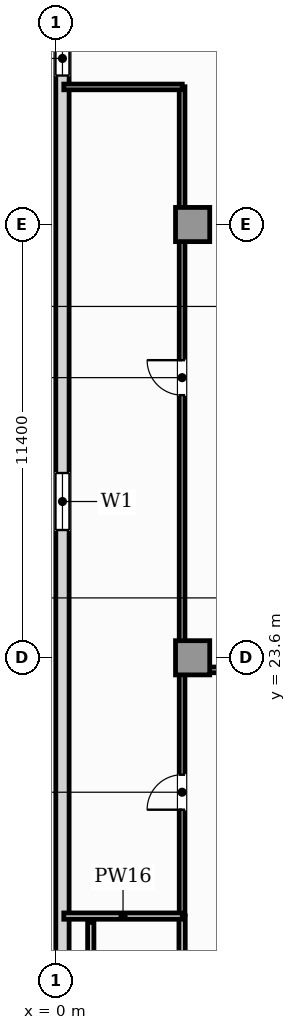
"""IFC4 building model, lengths in metres.
Left out: names, types, materials, properties, quantities, classifications, styles, units other than length and angle.
Written with IfcOpenShell. Run it as: python <this file> out.ifc"""

import sys

from ifc_helpers import new_model, si_unit, direction, frame, frame_2d, origin, origin_2d, place, context, subcontext, project, spatial, rectangle, extrude, element, fill, save


model = new_model("IFC4")
c1 = context("Model", 3, precision=1e-05, world=origin(), true_north=direction((0.0, 1.0)))
c2 = subcontext(c1, "Body", "Model", "MODEL_VIEW")
j1 = project(units=[si_unit("LENGTHUNIT", "METRE"), si_unit("PLANEANGLEUNIT", "RADIAN")], contexts=[c1])
p1 = place(None, origin())
s1 = spatial("IfcSite", under=j1, at=p1, CompositionType="ELEMENT")
p2 = place(p1, origin())
s2 = spatial("IfcBuilding", under=s1, at=p2, CompositionType="ELEMENT")
p3 = place(p2, frame((0.0, 0.0, 72.15)))
s3 = spatial("IfcBuildingStorey", under=s2, at=p3, CompositionType="ELEMENT", Elevation=72.15)
for number, where, z_axis, x_axis in (
    (1, (3.6, 23.6, 0.0), (0.0, 0.0, 1.0), (1.0, 0.0, 0.0)),
    (2, (3.6, 35.0, 0.0), (0.0, 0.0, 1.0), (1.0, 0.0, 0.0)),
):
    element("IfcColumn", number, at=place(p3, frame(where, z_axis=z_axis, x_axis=x_axis)), inside=s3, PredefinedType="COLUMN", context=c2, shape_type="SweptSolid", body=[
        extrude(rectangle(XDim=0.9, YDim=0.9, at=origin_2d()), origin(), (0.0, 0.0, 1.0), 3.85),
    ])
p4 = place(p3, frame((0.175, 43.16, 0.0), z_axis=(0.0, 0.0, 1.0), x_axis=(0.0, -1.0, 0.0)))
e3 = element("IfcWall", 3, at=p4, inside=s3, PredefinedType="SOLIDWALL", context=c2, shape_type="SweptSolid", body=[
    extrude(rectangle(XDim=39.92, YDim=0.35, at=frame_2d((19.96, 0.0))), origin(), (0.0, 0.0, 1.0), 3.57),
])
p5 = place(p4, frame((3.34, 0.0, 0.95)))
e4 = element("IfcOpeningElement", 4, at=p5, cuts=e3, PredefinedType="OPENING", context=c2, shape_type="SweptSolid", body=[
    extrude(rectangle(XDim=0.9, YDim=1.5, at=frame_2d((0.45, 0.75))), frame((0.0, 0.185, 0.0), z_axis=(0.0, -1.0, 0.0), x_axis=(1.0, 0.0, 0.0)), (0.0, 0.0, 1.0), 0.37),
])
p6 = place(p4, frame((14.698, 0.0, 0.9)))
e5 = element("IfcOpeningElement", 5, at=p6, cuts=e3, PredefinedType="OPENING", context=c2, shape_type="SweptSolid", body=[
    extrude(rectangle(XDim=1.5, YDim=1.95, at=frame_2d((0.75, 0.975))), frame((0.0, 0.185, 0.0), z_axis=(0.0, -1.0, 0.0), x_axis=(1.0, 0.0, 0.0)), (0.0, 0.0, 1.0), 0.37),
])
p7 = place(p3, frame((3.318, 23.282, 0.0), z_axis=(0.0, 0.0, 1.0), x_axis=(1.0, 0.0, 0.0)))
e6 = element("IfcWall", 6, at=p7, inside=s3, PredefinedType="PARTITIONING", context=c2, shape_type="SweptSolid", body=[
    extrude(rectangle(XDim=3.832, YDim=0.15, at=frame_2d((1.916, 0.0))), origin(), (0.0, 0.0, 1.0), 3.57),
])
p8 = place(p7, frame((1.456, 0.0, 0.0)))
e7 = element("IfcOpeningElement", 7, at=p8, cuts=e6, PredefinedType="OPENING", context=c2, shape_type="SweptSolid", body=[
    extrude(rectangle(XDim=0.92, YDim=2.1, at=frame_2d((0.46, 1.05))), frame((0.0, 0.085, 0.0), z_axis=(0.0, -1.0, 0.0), x_axis=(1.0, 0.0, 0.0)), (0.0, 0.0, 1.0), 0.17),
])
p9 = place(p3, frame((3.323, 13.765, 0.0), z_axis=(0.0, 0.0, 1.0), x_axis=(0.0, 1.0, 0.0)))
e8 = element("IfcWall", 8, at=p9, inside=s3, PredefinedType="PLUMBINGWALL", context=c2, shape_type="SweptSolid", body=[
    extrude(rectangle(XDim=3.044, YDim=0.165, at=frame_2d((1.522, 0.0))), origin(), (0.0, 0.0, 1.0), 3.57),
])
p10 = place(p9, frame((1.097, 0.0, 0.0)))
e9 = element("IfcOpeningElement", 9, at=p10, cuts=e8, PredefinedType="OPENING", context=c2, shape_type="SweptSolid", body=[
    extrude(rectangle(XDim=0.85, YDim=2.1, at=frame_2d((0.425, 1.05))), frame((0.0, 0.093, 0.0), z_axis=(0.0, -1.0, 0.0), x_axis=(1.0, 0.0, 0.0)), (0.0, 0.0, 1.0), 0.185),
])
p11 = place(p3, frame((3.323, 16.839, 0.0), z_axis=(0.0, 0.0, 1.0), x_axis=(0.0, 1.0, 0.0)))
e10 = element("IfcWall", 10, at=p11, inside=s3, PredefinedType="PARTITIONING", context=c2, shape_type="SweptSolid", body=[
    extrude(rectangle(XDim=6.448, YDim=0.15, at=frame_2d((3.224, 0.0))), origin(), (0.0, 0.0, 1.0), 3.57),
])
p12 = place(p11, frame((2.764, 0.0, 0.0)))
e11 = element("IfcOpeningElement", 11, at=p12, cuts=e10, PredefinedType="OPENING", context=c2, shape_type="SweptSolid", body=[
    extrude(rectangle(XDim=0.92, YDim=2.1, at=frame_2d((0.46, 1.05))), frame((0.0, 0.085, 0.0), z_axis=(0.0, -1.0, 0.0), x_axis=(1.0, 0.0, 0.0)), (0.0, 0.0, 1.0), 0.17),
])
p13 = place(p3, frame((3.323, 23.317, 0.0), z_axis=(0.0, 0.0, 1.0), x_axis=(0.0, 1.0, 0.0)))
e12 = element("IfcWall", 12, at=p13, inside=s3, PredefinedType="PARTITIONING", context=c2, shape_type="SweptSolid", body=[
    extrude(rectangle(XDim=15.308, YDim=0.15, at=frame_2d((7.654, 0.0))), origin(), (0.0, 0.0, 1.0), 3.57),
])
p14 = place(p13, frame((7.194, 0.0, 0.0)))
e13 = element("IfcOpeningElement", 13, at=p14, cuts=e12, PredefinedType="OPENING", context=c2, shape_type="SweptSolid", body=[
    extrude(rectangle(XDim=0.92, YDim=2.1, at=frame_2d((0.46, 1.05))), frame((0.0, 0.085, 0.0), z_axis=(0.0, -1.0, 0.0), x_axis=(1.0, 0.0, 0.0)), (0.0, 0.0, 1.0), 0.17),
])
p15 = place(p3, frame((0.21, 38.62, 0.0), z_axis=(0.0, 0.0, 1.0), x_axis=(1.0, 0.0, 0.0)))
e14 = element("IfcWall", 14, at=p15, inside=s3, PredefinedType="PARTITIONING", context=c2, shape_type="SweptSolid", body=[
    extrude(rectangle(XDim=3.118, YDim=0.15, at=frame_2d((1.559, 0.0))), origin(), (0.0, 0.0, 1.0), 3.57),
])
p16 = place(p3, frame((0.21, 16.804, 0.0), z_axis=(0.0, 0.0, 1.0), x_axis=(1.0, 0.0, 0.0)))
e15 = element("IfcWall", 15, at=p16, inside=s3, PredefinedType="PLUMBINGWALL", context=c2, shape_type="SweptSolid", body=[
    extrude(rectangle(XDim=3.118, YDim=0.165, at=frame_2d((1.559, 0.0))), origin(), (0.0, 0.0, 1.0), 3.57),
])
p17 = place(p3, frame((0.92, 13.765, 0.0), z_axis=(0.0, 0.0, 1.0), x_axis=(0.0, 1.0, 0.0)))
e16 = element("IfcWall", 16, at=p17, inside=s3, PredefinedType="PLUMBINGWALL", context=c2, shape_type="SweptSolid", body=[
    extrude(rectangle(XDim=2.874, YDim=0.165, at=frame_2d((1.437, 0.0))), origin(), (0.0, 0.0, 1.0), 3.57),
])
p18 = place(p5, origin())
e17 = element("IfcWindow", 17, at=p18, inside=s3, PartitioningType="SINGLE_PANEL", PredefinedType="WINDOW", context=c2, shape_type="SweptSolid", body=[
    extrude(rectangle(XDim=0.9, YDim=1.5, at=frame_2d((0.45, 0.75))), frame((0.0, 0.03, 0.0), z_axis=(0.0, -1.0, 0.0), x_axis=(1.0, 0.0, 0.0)), (0.0, 0.0, 1.0), 0.06),
])
fill(e4, e17)
p19 = place(p6, origin())
e18 = element("IfcWindow", 18, at=p19, inside=s3, PartitioningType="SINGLE_PANEL", PredefinedType="WINDOW", context=c2, shape_type="SweptSolid", body=[
    extrude(rectangle(XDim=1.5, YDim=1.95, at=frame_2d((0.75, 0.975))), frame((0.0, 0.03, 0.0), z_axis=(0.0, -1.0, 0.0), x_axis=(1.0, 0.0, 0.0)), (0.0, 0.0, 1.0), 0.06),
])
fill(e5, e18)
p20 = place(p12, origin())
e19 = element("IfcDoor", 19, at=p20, inside=s3, OperationType="SINGLE_SWING_LEFT", PredefinedType="DOOR", context=c2, shape_type="SweptSolid", body=[
    extrude(rectangle(XDim=0.92, YDim=2.1, at=frame_2d((0.46, 1.05))), frame((0.0, 0.025, 0.0), z_axis=(0.0, -1.0, 0.0), x_axis=(1.0, 0.0, 0.0)), (0.0, 0.0, 1.0), 0.05),
])
fill(e11, e19)
p21 = place(p14, origin())
e20 = element("IfcDoor", 20, at=p21, inside=s3, OperationType="SINGLE_SWING_RIGHT", PredefinedType="DOOR", context=c2, shape_type="SweptSolid", body=[
    extrude(rectangle(XDim=0.92, YDim=2.1, at=frame_2d((0.46, 1.05))), frame((0.0, 0.025, 0.0), z_axis=(0.0, -1.0, 0.0), x_axis=(1.0, 0.0, 0.0)), (0.0, 0.0, 1.0), 0.05),
])
fill(e13, e20)
save(model, sys.argv[1])
